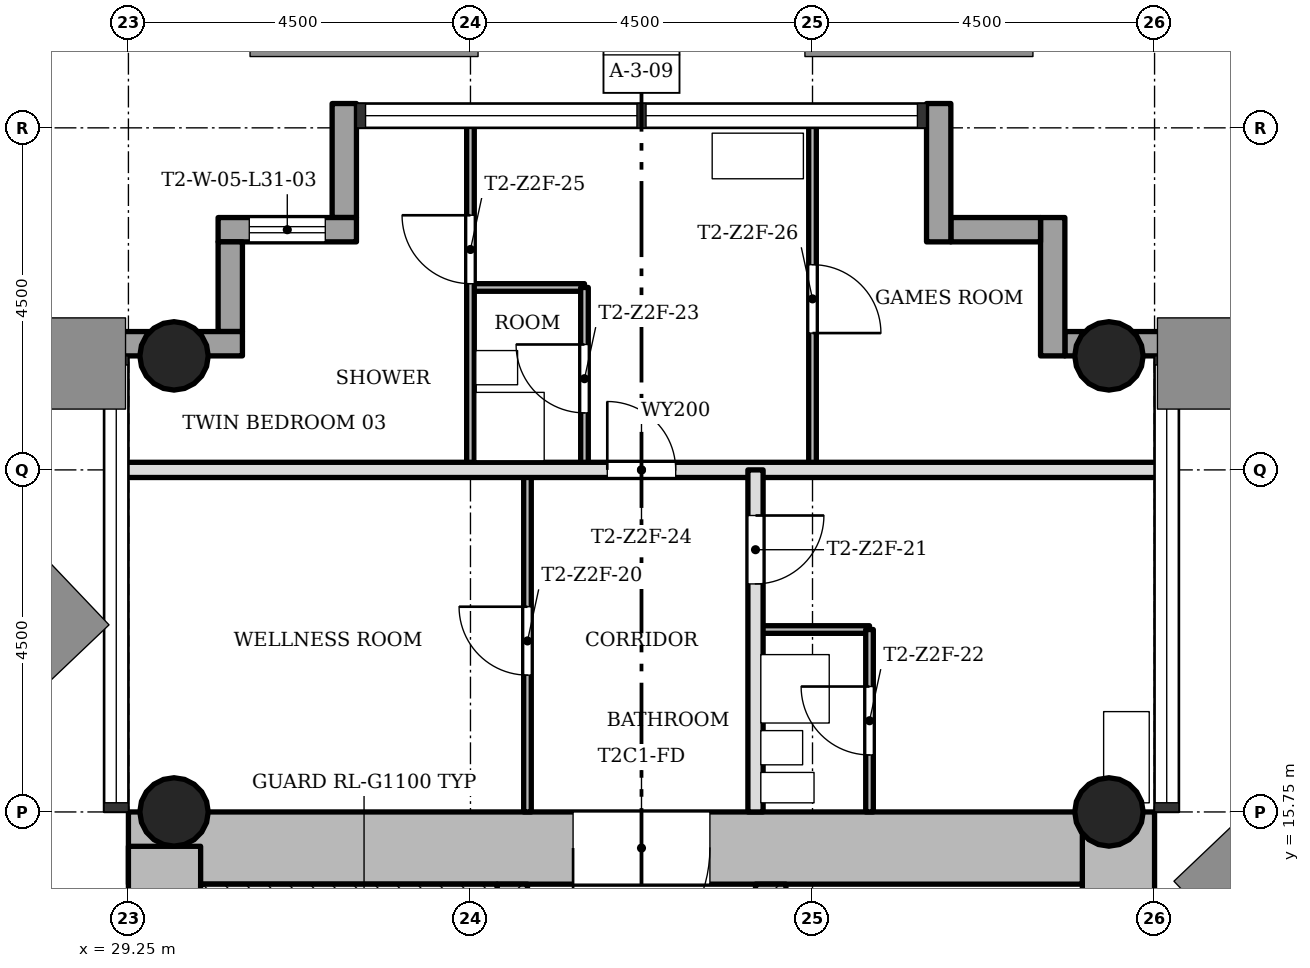
"""IFC4 building model, lengths in metres.
Left out: names, types, materials, properties, quantities, classifications, styles, units other than length and angle.
Written with IfcOpenShell. Run it as: python <this file> out.ifc"""

import sys

from ifc_helpers import new_model, si_unit, direction, frame, frame_2d, origin, origin_2d, place, context, subcontext, project, spatial, rectangle, hollow_circle, extrude, element, fill, save


model = new_model("IFC4")
c1 = context("Model", 3, precision=1e-05, world=origin(), true_north=direction((0.0, 1.0)))
c2 = subcontext(c1, "Body", "Model", "MODEL_VIEW")
j1 = project(units=[si_unit("LENGTHUNIT", "METRE"), si_unit("PLANEANGLEUNIT", "RADIAN")], contexts=[c1])
p1 = place(None, origin())
s1 = spatial("IfcSite", under=j1, at=p1, CompositionType="ELEMENT")
p2 = place(p1, origin())
s2 = spatial("IfcBuilding", under=s1, at=p2, CompositionType="ELEMENT")
p3 = place(p2, frame((0.0, 0.0, 114.0)))
s3 = spatial("IfcBuildingStorey", under=s2, at=p3, CompositionType="ELEMENT", Elevation=114.0)
p4 = place(p3, frame((42.275, 7.7, 0.0), z_axis=(0.0, 0.0, 1.0), x_axis=(0.0, 1.0, 0.0)))
e1 = element("IfcWall", 1, at=p4, inside=s3, PredefinedType="SHEAR", context=c2, shape_type="SweptSolid", body=[
    extrude(rectangle(XDim=8.05, YDim=0.95, at=frame_2d((4.025, 0.0))), origin(), (0.0, 0.0, 1.0), 3.4),
])
p5 = place(p3, frame((41.8, 15.275, 0.0), z_axis=(0.0, 0.0, 1.0), x_axis=(-1.0, 0.0, 0.0)))
e2 = element("IfcWall", 2, at=p5, inside=s3, PredefinedType="SHEAR", context=c2, shape_type="SweptSolid", body=[
    extrude(rectangle(XDim=12.55, YDim=0.95, at=frame_2d((6.275, 0.0))), origin(), (0.0, 0.0, 1.0), 3.4),
])
p6 = place(p5, frame((4.9, 0.0, 0.0)))
e3 = element("IfcOpeningElement", 3, at=p6, cuts=e2, PredefinedType="OPENING", context=c2, shape_type="SweptSolid", body=[
    extrude(rectangle(XDim=1.8, YDim=2.1, at=frame_2d((0.9, 1.05))), frame((0.0, 0.485, 0.0), z_axis=(0.0, -1.0, 0.0), x_axis=(1.0, 0.0, 0.0)), (0.0, 0.0, 1.0), 0.97),
])
p7 = place(p3, frame((29.725, 15.298, 0.0), z_axis=(0.0, 0.0, 1.0), x_axis=(0.0, -1.0, 0.0)))
e4 = element("IfcWall", 4, at=p7, inside=s3, PredefinedType="SHEAR", context=c2, shape_type="SweptSolid", body=[
    extrude(rectangle(XDim=8.696, YDim=0.95, at=frame_2d((4.348, 0.0))), origin(), (0.0, 0.0, 1.0), 3.4),
])
p8 = place(p3, frame((34.3, 7.7, 0.0), z_axis=(0.0, 0.0, 1.0), x_axis=(0.0, 1.0, 0.0)))
e5 = element("IfcWall", 5, at=p8, inside=s3, PredefinedType="SHEAR", context=c2, shape_type="SweptSolid", body=[
    extrude(rectangle(XDim=7.1, YDim=0.4, at=frame_2d((3.55, 0.0))), origin(), (0.0, 0.0, 1.0), 3.4),
])
p9 = place(p8, frame((0.7, 0.0, 0.0)))
e6 = element("IfcOpeningElement", 6, at=p9, cuts=e5, PredefinedType="OPENING", context=c2, shape_type="SweptSolid", body=[
    extrude(rectangle(XDim=0.9, YDim=2.1, at=frame_2d((0.45, 1.05))), frame((0.0, 0.21, 0.0), z_axis=(0.0, -1.0, 0.0), x_axis=(1.0, 0.0, 0.0)), (0.0, 0.0, 1.0), 0.42),
])
p10 = place(p3, frame((37.7, 7.7, 0.0), z_axis=(0.0, 0.0, 1.0), x_axis=(0.0, 1.0, 0.0)))
e7 = element("IfcWall", 7, at=p10, inside=s3, PredefinedType="SHEAR", context=c2, shape_type="SweptSolid", body=[
    extrude(rectangle(XDim=7.1, YDim=0.4, at=frame_2d((3.55, 0.0))), origin(), (0.0, 0.0, 1.0), 3.4),
])
p11 = place(p10, frame((0.8, 0.0, 0.0)))
e8 = element("IfcOpeningElement", 8, at=p11, cuts=e7, PredefinedType="OPENING", context=c2, shape_type="SweptSolid", body=[
    extrude(rectangle(XDim=1.1, YDim=2.1, at=frame_2d((0.55, 1.05))), frame((0.0, 0.21, 0.0), z_axis=(0.0, -1.0, 0.0), x_axis=(1.0, 0.0, 0.0)), (0.0, 0.0, 1.0), 0.42),
])
p12 = place(p10, frame((3.0, 0.0, 0.0)))
e9 = element("IfcOpeningElement", 9, at=p12, cuts=e7, PredefinedType="OPENING", context=c2, shape_type="SweptSolid", body=[
    extrude(rectangle(XDim=1.1, YDim=2.1, at=frame_2d((0.55, 1.05))), frame((0.0, 0.21, 0.0), z_axis=(0.0, -1.0, 0.0), x_axis=(1.0, 0.0, 0.0)), (0.0, 0.0, 1.0), 0.42),
])
p13 = place(p10, frame((5.2, 0.0, 0.0)))
e10 = element("IfcOpeningElement", 10, at=p13, cuts=e7, PredefinedType="OPENING", context=c2, shape_type="SweptSolid", body=[
    extrude(rectangle(XDim=1.1, YDim=2.1, at=frame_2d((0.55, 1.05))), frame((0.0, 0.21, 0.0), z_axis=(0.0, -1.0, 0.0), x_axis=(1.0, 0.0, 0.0)), (0.0, 0.0, 1.0), 0.42),
])
for number, where, z_axis, x_axis in (
    (11, (42.15, 15.75, 0.0), (0.0, 0.0, 1.0), (1.0, 0.0, 0.0)),
    (12, (29.85, 15.75, 0.0), (0.0, 0.0, 1.0), (1.0, 0.0, 0.0)),
    (13, (42.15, 21.75, 0.0), (0.0, 0.0, 1.0), (1.0, 0.0, 0.0)),
    (14, (29.85, 21.75, 0.0), (0.0, 0.0, 1.0), (1.0, 0.0, 0.0)),
):
    element("IfcColumn", number, at=place(p3, frame(where, z_axis=z_axis, x_axis=x_axis)), inside=s3, PredefinedType="COLUMN", context=c2, shape_type="SweptSolid", body=[
        extrude(hollow_circle(Radius=0.45, WallThickness=0.032, at=origin_2d()), origin(), (0.0, 0.0, 1.0), 3.4),
    ])
p14 = place(p3, frame((43.07, 21.91, -0.3), z_axis=(0.0, 0.0, 1.0), x_axis=(-1.0, 0.0, 0.0)))
e15 = element("IfcWall", 15, at=p14, inside=s3, PredefinedType="STANDARD", context=c2, shape_type="SweptSolid", body=[
    extrude(rectangle(XDim=1.5, YDim=0.32, at=frame_2d((0.75, 0.0))), origin(), (0.0, 0.0, 1.0), 3.4),
])
p15 = place(p3, frame((41.41, 21.75, -0.3), z_axis=(0.0, 0.0, 1.0), x_axis=(0.0, 1.0, 0.0)))
e16 = element("IfcWall", 16, at=p15, inside=s3, PredefinedType="STANDARD", context=c2, shape_type="SweptSolid", body=[
    extrude(rectangle(XDim=1.82, YDim=0.32, at=frame_2d((0.91, 0.0))), origin(), (0.0, 0.0, 1.0), 3.4),
])
p16 = place(p3, frame((41.25, 23.41, -0.3), z_axis=(0.0, 0.0, 1.0), x_axis=(-1.0, 0.0, 0.0)))
e17 = element("IfcWall", 17, at=p16, inside=s3, PredefinedType="STANDARD", context=c2, shape_type="SweptSolid", body=[
    extrude(rectangle(XDim=1.18, YDim=0.32, at=frame_2d((0.59, 0.0))), origin(), (0.0, 0.0, 1.0), 3.4),
])
p17 = place(p3, frame((39.91, 23.25, -0.3), z_axis=(0.0, 0.0, 1.0), x_axis=(0.0, 1.0, 0.0)))
e18 = element("IfcWall", 18, at=p17, inside=s3, PredefinedType="STANDARD", context=c2, shape_type="SweptSolid", body=[
    extrude(rectangle(XDim=1.82, YDim=0.32, at=frame_2d((0.91, 0.0))), origin(), (0.0, 0.0, 1.0), 3.4),
])
p18 = place(p3, frame((32.09, 25.07, -0.3), z_axis=(0.0, 0.0, 1.0), x_axis=(0.0, -1.0, 0.0)))
e19 = element("IfcWall", 19, at=p18, inside=s3, PredefinedType="STANDARD", context=c2, shape_type="SweptSolid", body=[
    extrude(rectangle(XDim=1.5, YDim=0.32, at=frame_2d((0.75, 0.0))), origin(), (0.0, 0.0, 1.0), 3.4),
])
p19 = place(p3, frame((32.25, 23.41, -0.3), z_axis=(0.0, 0.0, 1.0), x_axis=(-1.0, 0.0, 0.0)))
e20 = element("IfcWall", 20, at=p19, inside=s3, PredefinedType="STANDARD", context=c2, shape_type="SweptSolid", body=[
    extrude(rectangle(XDim=1.82, YDim=0.32, at=frame_2d((0.91, 0.0))), origin(), (0.0, 0.0, 1.0), 3.4),
])
p20 = place(p19, frame((0.41, 0.0, 1.2)))
e21 = element("IfcOpeningElement", 21, at=p20, cuts=e20, PredefinedType="OPENING", context=c2, shape_type="SweptSolid", body=[
    extrude(rectangle(XDim=1.0, YDim=1.5, at=frame_2d((0.5, 0.75))), frame((0.0, 0.17, 0.0), z_axis=(0.0, -1.0, 0.0), x_axis=(1.0, 0.0, 0.0)), (0.0, 0.0, 1.0), 0.34),
])
p21 = place(p3, frame((30.59, 23.25, -0.3), z_axis=(0.0, 0.0, 1.0), x_axis=(0.0, -1.0, 0.0)))
e22 = element("IfcWall", 22, at=p21, inside=s3, PredefinedType="STANDARD", context=c2, shape_type="SweptSolid", body=[
    extrude(rectangle(XDim=1.18, YDim=0.32, at=frame_2d((0.59, 0.0))), origin(), (0.0, 0.0, 1.0), 3.4),
])
p22 = place(p3, frame((30.75, 21.91, -0.3), z_axis=(0.0, 0.0, 1.0), x_axis=(-1.0, 0.0, 0.0)))
e23 = element("IfcWall", 23, at=p22, inside=s3, PredefinedType="STANDARD", context=c2, shape_type="SweptSolid", body=[
    extrude(rectangle(XDim=1.82, YDim=0.32, at=frame_2d((0.91, 0.0))), origin(), (0.0, 0.0, 1.0), 3.4),
])
p23 = place(p3, frame((39.0, 18.15, 0.0), z_axis=(0.0, 0.0, 1.0), x_axis=(-1.0, 0.0, 0.0)))
e24 = element("IfcWall", 24, at=p23, inside=s3, PredefinedType="PARTITIONING", context=c2, shape_type="SweptSolid", body=[
    extrude(rectangle(XDim=1.5, YDim=0.1, at=frame_2d((0.75, 0.0))), origin(), (0.0, 0.0, 1.0), 3.0),
])
p24 = place(p3, frame((42.85, 20.25, 0.0), z_axis=(0.0, 0.0, 1.0), x_axis=(-1.0, 0.0, 0.0)))
e25 = element("IfcWall", 25, at=p24, inside=s3, PredefinedType="SOLIDWALL", context=c2, shape_type="SweptSolid", body=[
    extrude(rectangle(XDim=13.7, YDim=0.2, at=frame_2d((6.85, 0.0))), origin(), (0.0, 0.0, 1.0), 3.0),
])
p25 = place(p24, frame((6.4, 0.0, 0.0)))
e26 = element("IfcOpeningElement", 26, at=p25, cuts=e25, PredefinedType="OPENING", context=c2, shape_type="SweptSolid", body=[
    extrude(rectangle(XDim=0.9, YDim=2.1, at=frame_2d((0.45, 1.05))), frame((0.0, 0.11, 0.0), z_axis=(0.0, -1.0, 0.0), x_axis=(1.0, 0.0, 0.0)), (0.0, 0.0, 1.0), 0.22),
])
p26 = place(p3, frame((35.25, 22.65, 0.0), z_axis=(0.0, 0.0, 1.0), x_axis=(-1.0, 0.0, 0.0)))
e27 = element("IfcWall", 27, at=p26, inside=s3, PredefinedType="PARTITIONING", context=c2, shape_type="SweptSolid", body=[
    extrude(rectangle(XDim=1.5, YDim=0.1, at=frame_2d((0.75, 0.0))), origin(), (0.0, 0.0, 1.0), 3.0),
])
p27 = place(p3, frame((39.0, 15.75, 0.0), z_axis=(0.0, 0.0, 1.0), x_axis=(0.0, 1.0, 0.0)))
e28 = element("IfcWall", 28, at=p27, inside=s3, PredefinedType="PARTITIONING", context=c2, shape_type="SweptSolid", body=[
    extrude(rectangle(XDim=2.4, YDim=0.1, at=frame_2d((1.2, 0.0))), origin(), (0.0, 0.0, 1.0), 3.0),
])
p28 = place(p27, frame((0.75, 0.0, 0.0)))
e29 = element("IfcOpeningElement", 29, at=p28, cuts=e28, PredefinedType="OPENING", context=c2, shape_type="SweptSolid", body=[
    extrude(rectangle(XDim=0.9, YDim=2.1, at=frame_2d((0.45, 1.05))), frame((0.0, 0.06, 0.0), z_axis=(0.0, -1.0, 0.0), x_axis=(1.0, 0.0, 0.0)), (0.0, 0.0, 1.0), 0.12),
])
p29 = place(p3, frame((38.25, 20.25, 0.0), z_axis=(0.0, 0.0, 1.0), x_axis=(0.0, 1.0, 0.0)))
e30 = element("IfcWall", 30, at=p29, inside=s3, PredefinedType="PARTITIONING", context=c2, shape_type="SweptSolid", body=[
    extrude(rectangle(XDim=4.6, YDim=0.1, at=frame_2d((2.3, 0.0))), origin(), (0.0, 0.0, 1.0), 3.0),
])
p30 = place(p29, frame((1.8, 0.0, 0.0)))
e31 = element("IfcOpeningElement", 31, at=p30, cuts=e30, PredefinedType="OPENING", context=c2, shape_type="SweptSolid", body=[
    extrude(rectangle(XDim=0.9, YDim=2.1, at=frame_2d((0.45, 1.05))), frame((0.0, 0.06, 0.0), z_axis=(0.0, -1.0, 0.0), x_axis=(1.0, 0.0, 0.0)), (0.0, 0.0, 1.0), 0.12),
])
p31 = place(p3, frame((37.5, 15.75, 0.0), z_axis=(0.0, 0.0, 1.0), x_axis=(0.0, 1.0, 0.0)))
e32 = element("IfcWall", 32, at=p31, inside=s3, PredefinedType="SOLIDWALL", context=c2, shape_type="SweptSolid", body=[
    extrude(rectangle(XDim=4.5, YDim=0.2, at=frame_2d((2.25, 0.0))), origin(), (0.0, 0.0, 1.0), 3.0),
])
p32 = place(p31, frame((3.0, 0.0, 0.0)))
e33 = element("IfcOpeningElement", 33, at=p32, cuts=e32, PredefinedType="OPENING", context=c2, shape_type="SweptSolid", body=[
    extrude(rectangle(XDim=0.9, YDim=2.1, at=frame_2d((0.45, 1.05))), frame((0.0, 0.11, 0.0), z_axis=(0.0, -1.0, 0.0), x_axis=(1.0, 0.0, 0.0)), (0.0, 0.0, 1.0), 0.22),
])
p33 = place(p3, frame((35.25, 20.25, 0.0), z_axis=(0.0, 0.0, 1.0), x_axis=(0.0, 1.0, 0.0)))
e34 = element("IfcWall", 34, at=p33, inside=s3, PredefinedType="PARTITIONING", context=c2, shape_type="SweptSolid", body=[
    extrude(rectangle(XDim=2.4, YDim=0.1, at=frame_2d((1.2, 0.0))), origin(), (0.0, 0.0, 1.0), 3.0),
])
p34 = place(p33, frame((0.75, 0.0, 0.0)))
e35 = element("IfcOpeningElement", 35, at=p34, cuts=e34, PredefinedType="OPENING", context=c2, shape_type="SweptSolid", body=[
    extrude(rectangle(XDim=0.9, YDim=2.1, at=frame_2d((0.45, 1.05))), frame((0.0, 0.06, 0.0), z_axis=(0.0, -1.0, 0.0), x_axis=(1.0, 0.0, 0.0)), (0.0, 0.0, 1.0), 0.12),
])
p35 = place(p3, frame((34.5, 15.75, 0.0), z_axis=(0.0, 0.0, 1.0), x_axis=(0.0, 1.0, 0.0)))
e36 = element("IfcWall", 36, at=p35, inside=s3, PredefinedType="PARTITIONING", context=c2, shape_type="SweptSolid", body=[
    extrude(rectangle(XDim=4.5, YDim=0.1, at=frame_2d((2.25, 0.0))), origin(), (0.0, 0.0, 1.0), 3.0),
])
p36 = place(p35, frame((1.8, 0.0, 0.0)))
e37 = element("IfcOpeningElement", 37, at=p36, cuts=e36, PredefinedType="OPENING", context=c2, shape_type="SweptSolid", body=[
    extrude(rectangle(XDim=0.9, YDim=2.1, at=frame_2d((0.45, 1.05))), frame((0.0, 0.06, 0.0), z_axis=(0.0, -1.0, 0.0), x_axis=(1.0, 0.0, 0.0)), (0.0, 0.0, 1.0), 0.12),
])
p37 = place(p3, frame((33.75, 20.25, 0.0), z_axis=(0.0, 0.0, 1.0), x_axis=(0.0, 1.0, 0.0)))
e38 = element("IfcWall", 38, at=p37, inside=s3, PredefinedType="PARTITIONING", context=c2, shape_type="SweptSolid", body=[
    extrude(rectangle(XDim=4.6, YDim=0.1, at=frame_2d((2.3, 0.0))), origin(), (0.0, 0.0, 1.0), 3.0),
])
p38 = place(p37, frame((2.45, 0.0, 0.0)))
e39 = element("IfcOpeningElement", 39, at=p38, cuts=e38, PredefinedType="OPENING", context=c2, shape_type="SweptSolid", body=[
    extrude(rectangle(XDim=0.9, YDim=2.1, at=frame_2d((0.45, 1.05))), frame((0.0, 0.06, 0.0), z_axis=(0.0, -1.0, 0.0), x_axis=(1.0, 0.0, 0.0)), (0.0, 0.0, 1.0), 0.12),
])
p39 = place(p3, frame((34.1, 14.675, 0.0), z_axis=(0.0, 0.0, 1.0), x_axis=(-1.0, 0.0, 0.0)))
e40 = element("IfcWall", 40, at=p39, inside=s3, PredefinedType="SHEAR", context=c2, shape_type="SweptSolid", body=[
    extrude(rectangle(XDim=3.9, YDim=0.25, at=frame_2d((1.95, 0.0))), origin(), (0.0, 0.0, 1.0), 3.4),
])
p40 = place(p36, origin())
e41 = element("IfcDoor", 41, at=p40, inside=s3, OperationType="SINGLE_SWING_LEFT", PredefinedType="DOOR", context=c2, shape_type="SweptSolid", body=[
    extrude(rectangle(XDim=0.9, YDim=2.1, at=frame_2d((0.45, 1.05))), frame((0.0, 0.025, 0.0), z_axis=(0.0, -1.0, 0.0), x_axis=(1.0, 0.0, 0.0)), (0.0, 0.0, 1.0), 0.05),
])
fill(e37, e41)
p41 = place(p32, origin())
e42 = element("IfcDoor", 42, at=p41, inside=s3, OperationType="SINGLE_SWING_RIGHT", PredefinedType="DOOR", context=c2, shape_type="SweptSolid", body=[
    extrude(rectangle(XDim=0.9, YDim=2.1, at=frame_2d((0.45, 1.05))), frame((0.0, 0.025, 0.0), z_axis=(0.0, -1.0, 0.0), x_axis=(1.0, 0.0, 0.0)), (0.0, 0.0, 1.0), 0.05),
])
fill(e33, e42)
p42 = place(p28, origin())
e43 = element("IfcDoor", 43, at=p42, inside=s3, OperationType="SINGLE_SWING_LEFT", PredefinedType="DOOR", context=c2, shape_type="SweptSolid", body=[
    extrude(rectangle(XDim=0.9, YDim=2.1, at=frame_2d((0.45, 1.05))), frame((0.0, 0.025, 0.0), z_axis=(0.0, -1.0, 0.0), x_axis=(1.0, 0.0, 0.0)), (0.0, 0.0, 1.0), 0.05),
])
fill(e29, e43)
p43 = place(p34, origin())
e44 = element("IfcDoor", 44, at=p43, inside=s3, OperationType="SINGLE_SWING_LEFT", PredefinedType="DOOR", context=c2, shape_type="SweptSolid", body=[
    extrude(rectangle(XDim=0.9, YDim=2.1, at=frame_2d((0.45, 1.05))), frame((0.0, 0.025, 0.0), z_axis=(0.0, -1.0, 0.0), x_axis=(1.0, 0.0, 0.0)), (0.0, 0.0, 1.0), 0.05),
])
fill(e35, e44)
p44 = place(p25, origin())
e45 = element("IfcDoor", 45, at=p44, inside=s3, OperationType="SINGLE_SWING_RIGHT", PredefinedType="DOOR", context=c2, shape_type="SweptSolid", body=[
    extrude(rectangle(XDim=0.9, YDim=2.1, at=frame_2d((0.45, 1.05))), frame((0.0, 0.025, 0.0), z_axis=(0.0, -1.0, 0.0), x_axis=(1.0, 0.0, 0.0)), (0.0, 0.0, 1.0), 0.05),
])
fill(e26, e45)
p45 = place(p38, origin())
e46 = element("IfcDoor", 46, at=p45, inside=s3, OperationType="SINGLE_SWING_LEFT", PredefinedType="DOOR", context=c2, shape_type="SweptSolid", body=[
    extrude(rectangle(XDim=0.9, YDim=2.1, at=frame_2d((0.45, 1.05))), frame((0.0, 0.025, 0.0), z_axis=(0.0, -1.0, 0.0), x_axis=(1.0, 0.0, 0.0)), (0.0, 0.0, 1.0), 0.05),
])
fill(e39, e46)
p46 = place(p30, origin())
e47 = element("IfcDoor", 47, at=p46, inside=s3, OperationType="SINGLE_SWING_LEFT", PredefinedType="DOOR", context=c2, shape_type="SweptSolid", body=[
    extrude(rectangle(XDim=0.9, YDim=2.1, at=frame_2d((0.45, 1.05))), frame((0.0, 0.025, 0.0), z_axis=(0.0, -1.0, 0.0), x_axis=(1.0, 0.0, 0.0)), (0.0, 0.0, 1.0), 0.05),
])
fill(e31, e47)
p47 = place(p6, origin())
e48 = element("IfcDoor", 48, at=p47, inside=s3, OperationType="SINGLE_SWING_LEFT", PredefinedType="DOOR", context=c2, shape_type="SweptSolid", body=[
    extrude(rectangle(XDim=1.8, YDim=2.1, at=frame_2d((0.9, 1.05))), frame((0.0, 0.025, 0.0), z_axis=(0.0, -1.0, 0.0), x_axis=(1.0, 0.0, 0.0)), (0.0, 0.0, 1.0), 0.05),
])
fill(e3, e48)
p48 = place(p20, origin())
e49 = element("IfcWindow", 49, at=p48, inside=s3, PartitioningType="SINGLE_PANEL", PredefinedType="WINDOW", context=c2, shape_type="SweptSolid", body=[
    extrude(rectangle(XDim=1.0, YDim=1.5, at=frame_2d((0.5, 0.75))), frame((0.0, 0.03, 0.0), z_axis=(0.0, -1.0, 0.0), x_axis=(1.0, 0.0, 0.0)), (0.0, 0.0, 1.0), 0.06),
])
fill(e21, e49)
save(model, sys.argv[1])
